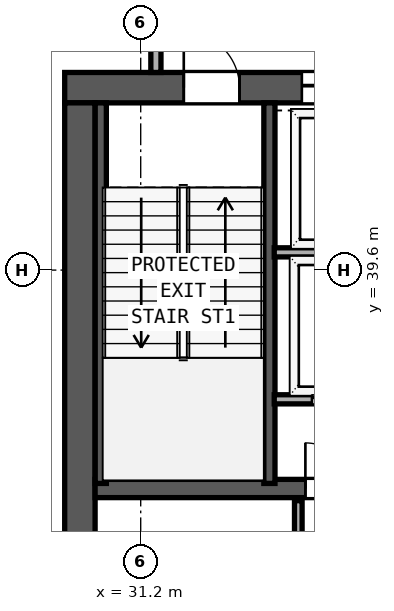
"""IFC4 building model, lengths in metres.
Left out: names, types, materials, properties, quantities, classifications, styles, units other than length and angle.
Written with IfcOpenShell. Run it as: python <this file> out.ifc"""

import sys

from ifc_helpers import new_model, si_unit, direction, frame, frame_2d, origin, place, context, subcontext, project, spatial, rectangle, extrude, element, fill, save


model = new_model("IFC4")
c1 = context("Model", 3, precision=1e-05, world=origin(), true_north=direction((0.0, 1.0)))
c2 = subcontext(c1, "Body", "Model", "MODEL_VIEW")
j1 = project(units=[si_unit("LENGTHUNIT", "METRE"), si_unit("PLANEANGLEUNIT", "RADIAN")], contexts=[c1])
p1 = place(None, origin())
s1 = spatial("IfcSite", under=j1, at=p1, CompositionType="ELEMENT")
p2 = place(p1, origin())
s2 = spatial("IfcBuilding", under=s1, at=p2, CompositionType="ELEMENT")
p3 = place(p2, frame((0.0, 0.0, 164.6)))
s3 = spatial("IfcBuildingStorey", under=s2, at=p3, CompositionType="ELEMENT", Elevation=164.6)
p4 = place(p3, frame((29.7, 43.2, 0.0), z_axis=(0.0, 0.0, 1.0), x_axis=(1.0, 0.0, 0.0)))
e1 = element("IfcWall", 1, at=p4, inside=s3, PredefinedType="SHEAR", context=c2, shape_type="SweptSolid", body=[
    extrude(rectangle(XDim=17.4, YDim=0.6, at=frame_2d((8.7, 0.0))), origin(), (0.0, 0.0, 1.0), 4.22),
])
p5 = place(p4, frame((2.35, 0.0, 0.0)))
e2 = element("IfcOpeningElement", 2, at=p5, cuts=e1, PredefinedType="OPENING", context=c2, shape_type="SweptSolid", body=[
    extrude(rectangle(XDim=1.1, YDim=2.15, at=frame_2d((0.55, 1.075))), frame((0.0, 0.31, 0.0), z_axis=(0.0, -1.0, 0.0), x_axis=(1.0, 0.0, 0.0)), (0.0, 0.0, 1.0), 0.62),
])
p6 = place(p4, frame((7.46, 0.0, 0.0)))
e3 = element("IfcOpeningElement", 3, at=p6, cuts=e1, PredefinedType="OPENING", context=c2, shape_type="SweptSolid", body=[
    extrude(rectangle(XDim=1.1, YDim=2.15, at=frame_2d((0.55, 1.075))), frame((0.0, 0.31, 0.0), z_axis=(0.0, -1.0, 0.0), x_axis=(1.0, 0.0, 0.0)), (0.0, 0.0, 1.0), 0.62),
])
p7 = place(p4, frame((13.55, 0.0, 0.0)))
e4 = element("IfcOpeningElement", 4, at=p7, cuts=e1, PredefinedType="OPENING", context=c2, shape_type="SweptSolid", body=[
    extrude(rectangle(XDim=1.1, YDim=2.15, at=frame_2d((0.55, 1.075))), frame((0.0, 0.31, 0.0), z_axis=(0.0, -1.0, 0.0), x_axis=(1.0, 0.0, 0.0)), (0.0, 0.0, 1.0), 0.62),
])
p8 = place(p4, frame((4.68, 0.0, 0.0)))
e5 = element("IfcOpeningElement", 5, at=p8, cuts=e1, PredefinedType="OPENING", context=c2, shape_type="SweptSolid", body=[
    extrude(rectangle(XDim=1.1, YDim=2.2, at=frame_2d((0.55, 1.1))), frame((0.0, 0.31, 0.0), z_axis=(0.0, -1.0, 0.0), x_axis=(1.0, 0.0, 0.0)), (0.0, 0.0, 1.0), 0.62),
])
p9 = place(p4, frame((11.04, 0.0, 0.0)))
e6 = element("IfcOpeningElement", 6, at=p9, cuts=e1, PredefinedType="OPENING", context=c2, shape_type="SweptSolid", body=[
    extrude(rectangle(XDim=1.1, YDim=2.2, at=frame_2d((0.55, 1.1))), frame((0.0, 0.31, 0.0), z_axis=(0.0, -1.0, 0.0), x_axis=(1.0, 0.0, 0.0)), (0.0, 0.0, 1.0), 0.62),
])
p10 = place(p3, frame((30.0, 32.8, 0.0), z_axis=(0.0, 0.0, 1.0), x_axis=(0.0, 1.0, 0.0)))
e7 = element("IfcWall", 7, at=p10, inside=s3, PredefinedType="SHEAR", context=c2, shape_type="SweptSolid", body=[
    extrude(rectangle(XDim=10.1, YDim=0.6, at=frame_2d((5.05, 0.0))), origin(), (0.0, 0.0, 1.0), 4.22),
])
p11 = place(p3, frame((30.3, 35.29, 0.0), z_axis=(0.0, 0.0, 1.0), x_axis=(1.0, 0.0, 0.0)))
e8 = element("IfcWall", 8, at=p11, inside=s3, PredefinedType="SHEAR", context=c2, shape_type="SweptSolid", body=[
    extrude(rectangle(XDim=16.2, YDim=0.36, at=frame_2d((8.1, 0.0))), origin(), (0.0, 0.0, 1.0), 4.22),
])
p12 = place(p11, frame((5.05, 0.0, 0.0), z_axis=(0.0, 0.0, 1.0), x_axis=(-1.0, 0.0, 0.0)))
e9 = element("IfcOpeningElement", 9, at=p12, cuts=e8, PredefinedType="OPENING", context=c2, shape_type="SweptSolid", body=[
    extrude(rectangle(XDim=0.9, YDim=2.1, at=frame_2d((0.45, 1.05))), frame((0.0, 0.19, 0.0), z_axis=(0.0, -1.0, 0.0), x_axis=(1.0, 0.0, 0.0)), (0.0, 0.0, 1.0), 0.38),
])
p13 = place(p11, frame((12.11, 0.0, 0.0), z_axis=(0.0, 0.0, 1.0), x_axis=(-1.0, 0.0, 0.0)))
e10 = element("IfcOpeningElement", 10, at=p13, cuts=e8, PredefinedType="OPENING", context=c2, shape_type="SweptSolid", body=[
    extrude(rectangle(XDim=0.9, YDim=2.1, at=frame_2d((0.45, 1.05))), frame((0.0, 0.19, 0.0), z_axis=(0.0, -1.0, 0.0), x_axis=(1.0, 0.0, 0.0)), (0.0, 0.0, 1.0), 0.38),
])
for number, where, z_axis, x_axis in (
    (11, (30.412, 35.39, 0.0), (0.0, 0.0, 1.0), (0.0, 1.0, 0.0)),
    (12, (33.74, 35.39, 0.0), (0.0, 0.0, 1.0), (0.0, 1.0, 0.0)),
):
    element("IfcWall", number, at=place(p3, frame(where, z_axis=z_axis, x_axis=x_axis)), inside=s3, PredefinedType="SHEAR", context=c2, shape_type="SweptSolid", body=[
        extrude(rectangle(XDim=7.51, YDim=0.22, at=frame_2d((3.755, 0.0))), origin(), (0.0, 0.0, 1.0), 4.22),
    ])
p14 = place(p3, frame((31.5, 43.5, 0.0), z_axis=(0.0, 0.0, 1.0), x_axis=(0.0, 1.0, 0.0)))
e13 = element("IfcWall", 13, at=p14, inside=s3, PredefinedType="SOLIDWALL", context=c2, shape_type="SweptSolid", body=[
    extrude(rectangle(XDim=2.935, YDim=0.2, at=frame_2d((1.468, 0.0))), origin(), (0.0, 0.0, 1.0), 4.22),
])
p15 = place(p14, frame((1.8, 0.0, 0.0), z_axis=(0.0, 0.0, 1.0), x_axis=(-1.0, 0.0, 0.0)))
e14 = element("IfcOpeningElement", 14, at=p15, cuts=e13, PredefinedType="OPENING", context=c2, shape_type="SweptSolid", body=[
    extrude(rectangle(XDim=1.1, YDim=2.15, at=frame_2d((0.55, 1.075))), frame((0.0, 0.11, 0.0), z_axis=(0.0, -1.0, 0.0), x_axis=(1.0, 0.0, 0.0)), (0.0, 0.0, 1.0), 0.22),
])
p16 = place(p3, frame((33.835, 39.95, 0.0), z_axis=(0.0, 0.0, 1.0), x_axis=(1.0, 0.0, 0.0)))
e15 = element("IfcWall", 15, at=p16, inside=s3, PredefinedType="SOLIDWALL", context=c2, shape_type="SweptSolid", body=[
    extrude(rectangle(XDim=2.77, YDim=0.18, at=frame_2d((1.385, 0.0))), origin(), (0.0, 0.0, 1.0), 4.22),
])
p17 = place(p3, frame((33.835, 37.05, 0.0), z_axis=(0.0, 0.0, 1.0), x_axis=(1.0, 0.0, 0.0)))
e16 = element("IfcWall", 16, at=p17, inside=s3, PredefinedType="SOLIDWALL", context=c2, shape_type="SweptSolid", body=[
    extrude(rectangle(XDim=2.77, YDim=0.18, at=frame_2d((1.385, 0.0))), origin(), (0.0, 0.0, 1.0), 4.22),
])
p18 = place(p17, frame((1.945, 0.0, 0.0), z_axis=(0.0, 0.0, 1.0), x_axis=(-1.0, 0.0, 0.0)))
e17 = element("IfcOpeningElement", 17, at=p18, cuts=e16, PredefinedType="OPENING", context=c2, shape_type="SweptSolid", body=[
    extrude(rectangle(XDim=1.2, YDim=2.2, at=frame_2d((0.6, 1.1))), frame((0.0, 0.1, 0.0), z_axis=(0.0, -1.0, 0.0), x_axis=(1.0, 0.0, 0.0)), (0.0, 0.0, 1.0), 0.2),
])
p19 = place(p3, frame((34.31, 32.88, 0.0), z_axis=(0.0, 0.0, 1.0), x_axis=(0.0, 1.0, 0.0)))
e18 = element("IfcWall", 18, at=p19, inside=s3, PredefinedType="SOLIDWALL", context=c2, shape_type="SweptSolid", body=[
    extrude(rectangle(XDim=2.17, YDim=0.15, at=frame_2d((1.085, 0.0))), origin(), (0.0, 0.0, 1.0), 4.22),
])
p20 = place(p5, origin())
e19 = element("IfcDoor", 19, at=p20, inside=s3, OperationType="SINGLE_SWING_LEFT", PredefinedType="DOOR", context=c2, shape_type="SweptSolid", body=[
    extrude(rectangle(XDim=1.1, YDim=2.15, at=frame_2d((0.55, 1.075))), frame((0.0, 0.185, 0.0), z_axis=(0.0, -1.0, 0.0), x_axis=(1.0, 0.0, 0.0)), (0.0, 0.0, 1.0), 0.05),
])
fill(e2, e19)
p21 = place(p8, origin())
e20 = element("IfcDoor", 20, at=p21, inside=s3, OperationType="SLIDING_TO_LEFT", PredefinedType="DOOR", context=c2, shape_type="SweptSolid", body=[
    extrude(rectangle(XDim=1.1, YDim=2.2, at=frame_2d((0.55, 1.1))), frame((0.0, 0.185, 0.0), z_axis=(0.0, -1.0, 0.0), x_axis=(1.0, 0.0, 0.0)), (0.0, 0.0, 1.0), 0.05),
])
fill(e5, e20)
p22 = place(p18, origin())
e21 = element("IfcDoor", 21, at=p22, inside=s3, OperationType="SLIDING_TO_RIGHT", PredefinedType="DOOR", context=c2, shape_type="SweptSolid", body=[
    extrude(rectangle(XDim=1.2, YDim=2.2, at=frame_2d((0.6, 1.1))), frame((0.0, 0.025, 0.0), z_axis=(0.0, -1.0, 0.0), x_axis=(1.0, 0.0, 0.0)), (0.0, 0.0, 1.0), 0.05),
])
fill(e17, e21)
p23 = place(p12, origin())
e22 = element("IfcDoor", 22, at=p23, inside=s3, OperationType="SINGLE_SWING_RIGHT", PredefinedType="DOOR", context=c2, shape_type="SweptSolid", body=[
    extrude(rectangle(XDim=0.9, YDim=2.1, at=frame_2d((0.45, 1.05))), frame((0.0, 0.025, 0.0), z_axis=(0.0, -1.0, 0.0), x_axis=(1.0, 0.0, 0.0)), (0.0, 0.0, 1.0), 0.05),
])
fill(e9, e22)
save(model, sys.argv[1])
